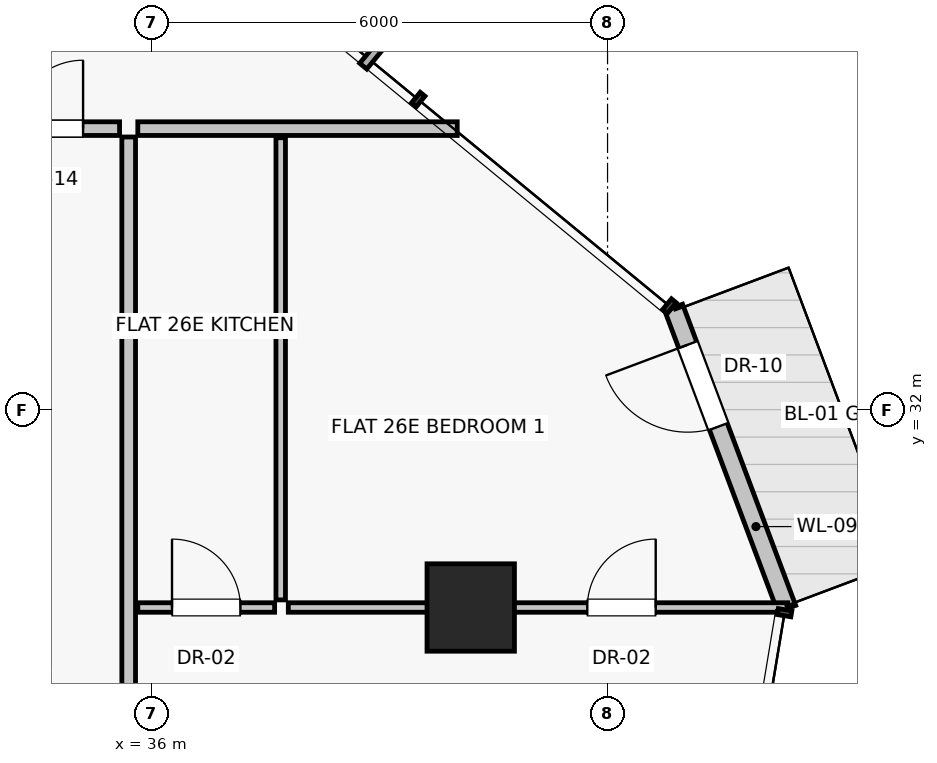
"""IFC4 building model, lengths in metres.
Left out: names, types, materials, properties, quantities, classifications, styles, units other than length and angle.
Written with IfcOpenShell. Run it as: python <this file> out.ifc"""

import sys

from ifc_helpers import new_model, si_unit, direction, frame, frame_2d, origin, origin_2d, place, context, subcontext, project, spatial, rectangle, extrude, source, transform, mapped, element, fill, save


model = new_model("IFC4")
c1 = context("Model", 3, precision=1e-05, world=origin(), true_north=direction((0.0, 1.0)))
c2 = subcontext(c1, "Body", "Model", "MODEL_VIEW")
j1 = project(units=[si_unit("LENGTHUNIT", "METRE"), si_unit("PLANEANGLEUNIT", "RADIAN")], contexts=[c1])
p1 = place(None, origin())
s1 = spatial("IfcSite", under=j1, at=p1, CompositionType="ELEMENT")
p2 = place(p1, origin())
s2 = spatial("IfcBuilding", under=s1, at=p2, CompositionType="ELEMENT")
p3 = place(p2, frame((0.0, 0.0, 95.95)))
s3 = spatial("IfcBuildingStorey", under=s2, at=p3, CompositionType="ELEMENT", Elevation=95.95)
p4 = place(p3, frame((40.2, 29.4, 0.0), z_axis=(0.0, 0.0, 1.0), x_axis=(1.0, 0.0, 0.0)))
e1 = element("IfcColumn", 1, at=p4, inside=s3, PredefinedType="COLUMN", context=c2, shape_type="SweptSolid", body=[
    extrude(rectangle(XDim=1.15, YDim=1.15, at=origin_2d()), origin(), (0.0, 0.0, 1.0), 3.25),
])
p5 = place(p3, frame((44.358, 29.383, 0.0), z_axis=(0.0, 0.0, 1.0), x_axis=(-0.351527922506, 0.936177397558, 0.0)))
e2 = element("IfcWall", 2, at=p5, inside=s3, PredefinedType="SOLIDWALL", context=c2, shape_type="SweptSolid", body=[
    extrude(rectangle(XDim=4.233, YDim=0.25, at=frame_2d((2.117, 0.0))), origin(), (0.0, 0.0, 1.0), 3.0),
])
p6 = place(p5, frame((2.56, 0.0, 0.0)))
e3 = element("IfcOpeningElement", 3, at=p6, cuts=e2, PredefinedType="OPENING", context=c2, shape_type="SweptSolid", body=[
    extrude(rectangle(XDim=1.15, YDim=2.25, at=frame_2d((0.575, 1.125))), frame((0.0, 0.135, 0.0), z_axis=(0.0, -1.0, 0.0), x_axis=(1.0, 0.0, 0.0)), (0.0, 0.0, 1.0), 0.27),
])
p7 = place(p3, frame((35.82, 35.7, 0.0), z_axis=(0.0, 0.0, 1.0), x_axis=(1.0, 0.0, 0.0)))
e4 = element("IfcWall", 4, at=p7, inside=s3, PredefinedType="PARTITIONING", context=c2, shape_type="SweptSolid", body=[
    extrude(rectangle(XDim=4.202, YDim=0.18, at=frame_2d((2.101, 0.0))), origin(), (0.0, 0.0, 1.0), 3.0),
])
p8 = place(p3, frame((35.7, 18.71, 0.0), z_axis=(0.0, 0.0, 1.0), x_axis=(0.0, 1.0, 0.0)))
e5 = element("IfcWall", 5, at=p8, inside=s3, PredefinedType="PARTITIONING", context=c2, shape_type="SweptSolid", body=[
    extrude(rectangle(XDim=16.88, YDim=0.18, at=frame_2d((8.44, 0.0))), origin(), (0.0, 0.0, 1.0), 2.58),
])
p9 = place(p8, frame((5.94, 0.0, 0.0)))
e6 = element("IfcOpeningElement", 6, at=p9, cuts=e5, PredefinedType="OPENING", context=c2, shape_type="SweptSolid", body=[
    extrude(rectangle(XDim=0.95, YDim=2.02, at=frame_2d((0.475, 1.01))), frame((0.0, 0.1, 0.0), z_axis=(0.0, -1.0, 0.0), x_axis=(1.0, 0.0, 0.0)), (0.0, 0.0, 1.0), 0.2),
])
p10 = place(p3, frame((35.82, 29.4, 0.0), z_axis=(0.0, 0.0, 1.0), x_axis=(1.0, 0.0, 0.0)))
e7 = element("IfcWall", 7, at=p10, inside=s3, PredefinedType="PARTITIONING", context=c2, shape_type="SweptSolid", body=[
    extrude(rectangle(XDim=1.8, YDim=0.125, at=frame_2d((0.9, 0.0))), origin(), (0.0, 0.0, 1.0), 2.378),
])
p11 = place(p10, frame((0.45, 0.0, 0.0)))
e8 = element("IfcOpeningElement", 8, at=p11, cuts=e7, PredefinedType="OPENING", context=c2, shape_type="SweptSolid", body=[
    extrude(rectangle(XDim=0.9, YDim=2.01, at=frame_2d((0.45, 1.005))), frame((0.0, 0.073, 0.0), z_axis=(0.0, -1.0, 0.0), x_axis=(1.0, 0.0, 0.0)), (0.0, 0.0, 1.0), 0.145),
])
p12 = place(p3, frame((37.7, 29.5, 0.0), z_axis=(0.0, 0.0, 1.0), x_axis=(0.0, 1.0, 0.0)))
e9 = element("IfcWall", 9, at=p12, inside=s3, PredefinedType="PARTITIONING", context=c2, shape_type="SweptSolid", body=[
    extrude(rectangle(XDim=6.08, YDim=0.125, at=frame_2d((3.04, 0.0))), origin(), (0.0, 0.0, 1.0), 3.0),
])
p13 = place(p3, frame((37.8, 29.4, 0.0), z_axis=(0.0, 0.0, 1.0), x_axis=(1.0, 0.0, 0.0)))
e10 = element("IfcWall", 10, at=p13, inside=s3, PredefinedType="PARTITIONING", context=c2, shape_type="SweptSolid", body=[
    extrude(rectangle(XDim=6.571, YDim=0.125, at=frame_2d((3.286, 0.0))), origin(), (0.0, 0.0, 1.0), 2.378),
])
p14 = place(p13, frame((3.934, 0.0, 0.0)))
e11 = element("IfcOpeningElement", 11, at=p14, cuts=e10, PredefinedType="OPENING", context=c2, shape_type="SweptSolid", body=[
    extrude(rectangle(XDim=0.9, YDim=2.01, at=frame_2d((0.45, 1.005))), frame((0.0, 0.073, 0.0), z_axis=(0.0, -1.0, 0.0), x_axis=(1.0, 0.0, 0.0)), (0.0, 0.0, 1.0), 0.145),
])
p15 = place(p3, frame((33.72, 35.7, 0.0), z_axis=(0.0, 0.0, 1.0), x_axis=(1.0, 0.0, 0.0)))
e12 = element("IfcWall", 12, at=p15, inside=s3, PredefinedType="PARTITIONING", context=c2, shape_type="SweptSolid", body=[
    extrude(rectangle(XDim=1.86, YDim=0.18, at=frame_2d((0.93, 0.0))), origin(), (0.0, 0.0, 1.0), 3.0),
])
p16 = place(p15, frame((0.48, 0.0, 0.0)))
e13 = element("IfcOpeningElement", 13, at=p16, cuts=e12, PredefinedType="OPENING", context=c2, shape_type="SweptSolid", body=[
    extrude(rectangle(XDim=0.9, YDim=2.01, at=frame_2d((0.45, 1.005))), frame((0.0, 0.1, 0.0), z_axis=(0.0, -1.0, 0.0), x_axis=(1.0, 0.0, 0.0)), (0.0, 0.0, 1.0), 0.2),
])
m1 = source(origin(), c2, "Body", "SweptSolid", [
    extrude(rectangle(XDim=1.15, YDim=2.25, at=frame_2d((0.575, 1.125))), frame((0.0, 0.025, 0.0), z_axis=(0.0, -1.0, 0.0), x_axis=(1.0, 0.0, 0.0)), (0.0, 0.0, 1.0), 0.05),
])
p17 = place(p6, frame((1.15, 0.0, 0.0), z_axis=(0.0, 0.0, 1.0), x_axis=(-1.0, 0.0, 0.0)))
e14 = element("IfcDoor", 14, at=p17, inside=s3, OperationType="SINGLE_SWING_RIGHT", PredefinedType="DOOR", context=c2, shape_type="MappedRepresentation", body=[
    mapped(m1, transform((0.0, 0.0, 0.0), scale=1.0)),
])
fill(e3, e14)
m2 = source(origin(), c2, "Body", "SweptSolid", [
    extrude(rectangle(XDim=0.9, YDim=2.01, at=frame_2d((0.45, 1.005))), frame((0.0, 0.025, 0.0), z_axis=(0.0, -1.0, 0.0), x_axis=(1.0, 0.0, 0.0)), (0.0, 0.0, 1.0), 0.05),
])
p18 = place(p11, origin())
e15 = element("IfcDoor", 15, at=p18, inside=s3, OperationType="SINGLE_SWING_LEFT", PredefinedType="DOOR", context=c2, shape_type="MappedRepresentation", body=[
    mapped(m2, transform((0.0, 0.0, 0.0), scale=1.0)),
])
fill(e8, e15)
p19 = place(p14, origin())
e16 = element("IfcDoor", 16, at=p19, inside=s3, OperationType="SINGLE_SWING_RIGHT", PredefinedType="DOOR", context=c2, shape_type="MappedRepresentation", body=[
    mapped(m2, transform((0.0, 0.0, 0.0), scale=1.0)),
])
fill(e11, e16)
p20 = place(p16, origin())
e17 = element("IfcDoor", 17, at=p20, inside=s3, OperationType="SINGLE_SWING_RIGHT", PredefinedType="DOOR", context=c2, shape_type="MappedRepresentation", body=[
    mapped(m2, transform((0.0, 0.0, 0.0), scale=1.0)),
])
fill(e13, e17)
save(model, sys.argv[1])
